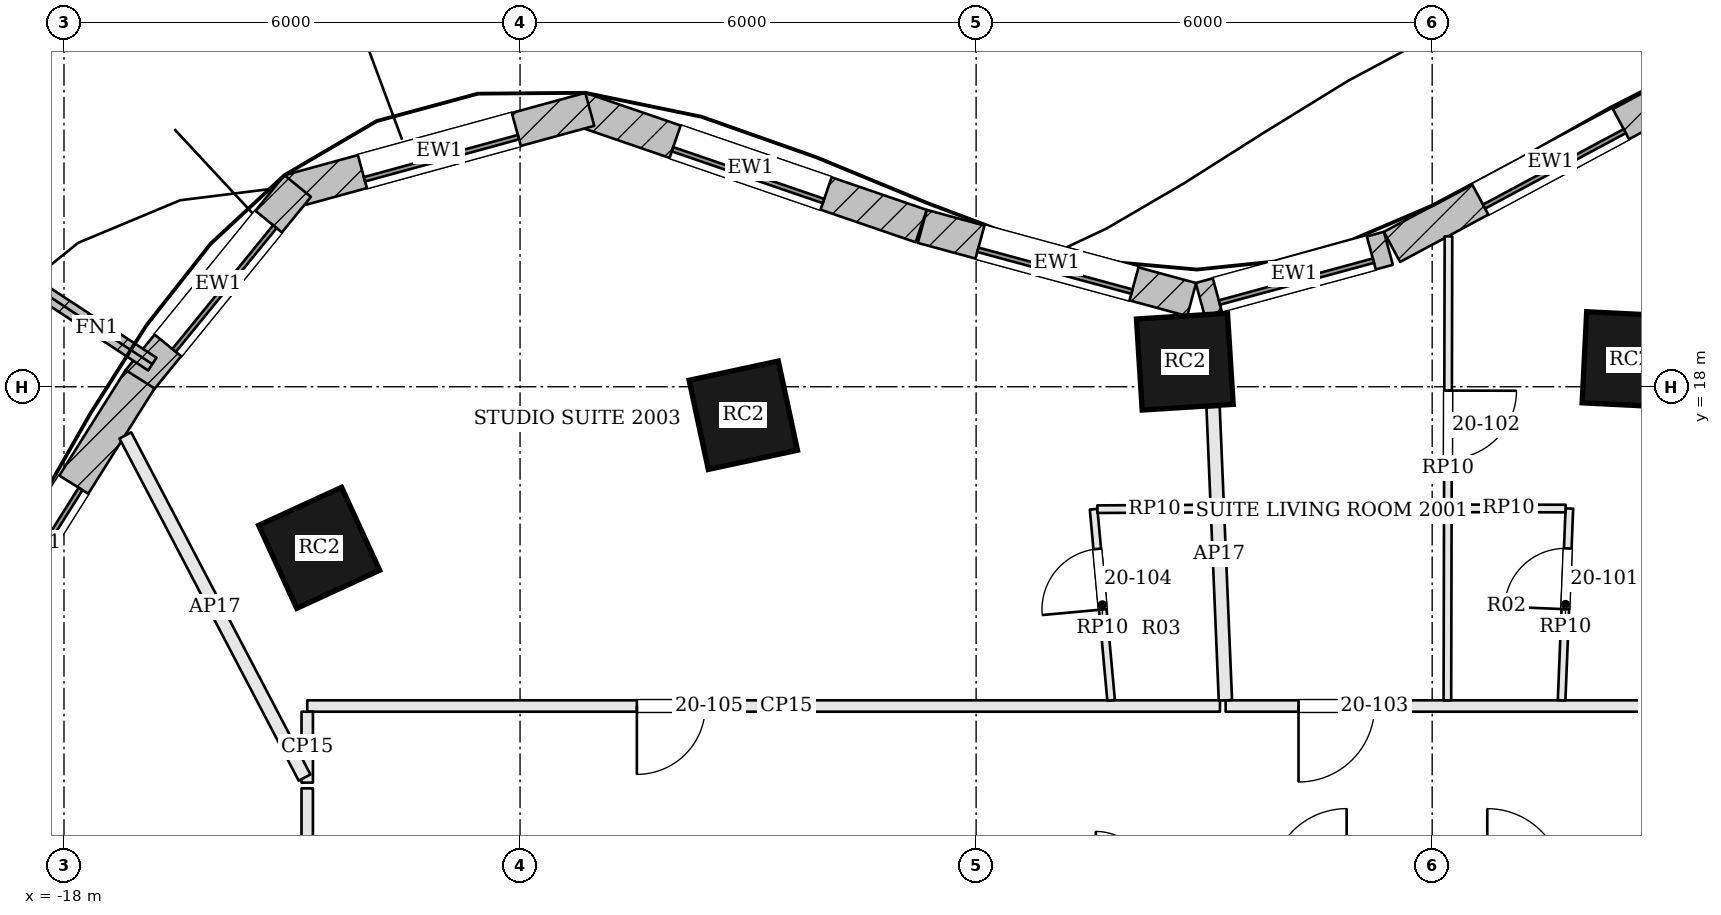
"""IFC4 building model, lengths in metres.
Left out: names, types, materials, properties, quantities, classifications, styles, units other than length and angle.
Written with IfcOpenShell. Run it as: python <this file> out.ifc"""

import sys

from ifc_helpers import new_model, si_unit, direction, frame, frame_2d, origin, origin_2d, place, context, subcontext, project, spatial, rectangle, extrude, element, fill, save


model = new_model("IFC4")
c1 = context("Model", 3, precision=1e-05, world=origin(), true_north=direction((0.0, 1.0)))
c2 = subcontext(c1, "Body", "Model", "MODEL_VIEW")
j1 = project(units=[si_unit("LENGTHUNIT", "METRE"), si_unit("PLANEANGLEUNIT", "RADIAN")], contexts=[c1])
p1 = place(None, origin())
s1 = spatial("IfcSite", under=j1, at=p1, CompositionType="ELEMENT")
p2 = place(p1, origin())
s2 = spatial("IfcBuilding", under=s1, at=p2, CompositionType="ELEMENT")
p3 = place(p2, frame((0.0, 0.0, 88.8)))
s3 = spatial("IfcBuildingStorey", under=s2, at=p3, CompositionType="ELEMENT", Elevation=88.8)
for number, where, z_axis, x_axis in (
    (1, (2.602, 18.358, 0.0), (0.0, 0.0, 1.0), (-0.999, 0.05, 0.0)),
    (2, (-3.254, 18.33, 0.0), (0.0, 0.0, 1.0), (-0.998, -0.063, 0.0)),
    (3, (-9.063, 17.625, 0.0), (0.0, 0.0, 1.0), (-0.978, -0.21, 0.0)),
    (4, (-14.643, 15.881, 0.0), (0.0, 0.0, 1.0), (-0.909, -0.417, 0.0)),
):
    element("IfcColumn", number, at=place(p3, frame(where, z_axis=z_axis, x_axis=x_axis)), inside=s3, PredefinedType="COLUMN", context=c2, shape_type="SweptSolid", body=[
        extrude(rectangle(XDim=1.2, YDim=1.2, at=origin_2d()), origin(), (0.0, 0.0, 1.0), 3.6),
    ])
p4 = place(p3, frame((3.646, 22.079, 0.0), z_axis=(0.0, 0.0, 1.0), x_axis=(-0.881279133897, -0.472596115259, 0.0)))
e5 = element("IfcWall", 5, at=p4, inside=s3, PredefinedType="SOLIDWALL", context=c2, shape_type="SweptSolid", body=[
    extrude(rectangle(XDim=4.737, YDim=0.45, at=frame_2d((2.368, 0.0))), origin(), (0.0, 0.0, 1.0), 3.4),
])
p5 = place(p4, frame((1.318, 0.0, 0.9)))
e6 = element("IfcOpeningElement", 6, at=p5, cuts=e5, PredefinedType="OPENING", context=c2, shape_type="SweptSolid", body=[
    extrude(rectangle(XDim=2.1, YDim=2.0, at=frame_2d((1.05, 1.0))), frame((0.0, 0.235, 0.0), z_axis=(0.0, -1.0, 0.0), x_axis=(1.0, 0.0, 0.0)), (0.0, 0.0, 1.0), 0.47),
])
p6 = place(p3, frame((-0.576, 19.821, 0.0), z_axis=(0.0, 0.0, 1.0), x_axis=(-0.965009398019, -0.262215296532, 0.0)))
e7 = element("IfcWall", 7, at=p6, inside=s3, PredefinedType="SOLIDWALL", context=c2, shape_type="SweptSolid", body=[
    extrude(rectangle(XDim=2.565, YDim=0.45, at=frame_2d((1.283, 0.0))), origin(), (0.0, 0.0, 1.0), 3.4),
])
p7 = place(p6, frame((0.233, 0.0, 0.9)))
e8 = element("IfcOpeningElement", 8, at=p7, cuts=e7, PredefinedType="OPENING", context=c2, shape_type="SweptSolid", body=[
    extrude(rectangle(XDim=2.1, YDim=2.0, at=frame_2d((1.05, 1.0))), frame((0.0, 0.235, 0.0), z_axis=(0.0, -1.0, 0.0), x_axis=(1.0, 0.0, 0.0)), (0.0, 0.0, 1.0), 0.47),
])
p8 = place(p3, frame((-3.164, 19.147, 0.0), z_axis=(0.0, 0.0, 1.0), x_axis=(-0.965039479998, 0.262104563191, 0.0)))
e9 = element("IfcWall", 9, at=p8, inside=s3, PredefinedType="SOLIDWALL", context=c2, shape_type="SweptSolid", body=[
    extrude(rectangle(XDim=3.672, YDim=0.45, at=frame_2d((1.836, 0.0))), origin(), (0.0, 0.0, 1.0), 3.4),
])
p9 = place(p8, frame((0.786, 0.0, 0.9)))
e10 = element("IfcOpeningElement", 10, at=p9, cuts=e9, PredefinedType="OPENING", context=c2, shape_type="SweptSolid", body=[
    extrude(rectangle(XDim=2.1, YDim=2.0, at=frame_2d((1.05, 1.0))), frame((0.0, 0.235, 0.0), z_axis=(0.0, -1.0, 0.0), x_axis=(1.0, 0.0, 0.0)), (0.0, 0.0, 1.0), 0.47),
])
p10 = place(p3, frame((-6.723, 20.114, 0.0), z_axis=(0.0, 0.0, 1.0), x_axis=(-0.945947299026, 0.324320377815, 0.0)))
e11 = element("IfcWall", 11, at=p10, inside=s3, PredefinedType="SOLIDWALL", context=c2, shape_type="SweptSolid", body=[
    extrude(rectangle(XDim=4.745, YDim=0.45, at=frame_2d((2.372, 0.0))), origin(), (0.0, 0.0, 1.0), 3.4),
])
p11 = place(p10, frame((1.322, 0.0, 0.9)))
e12 = element("IfcOpeningElement", 12, at=p11, cuts=e11, PredefinedType="OPENING", context=c2, shape_type="SweptSolid", body=[
    extrude(rectangle(XDim=2.1, YDim=2.0, at=frame_2d((1.05, 1.0))), frame((0.0, 0.235, 0.0), z_axis=(0.0, -1.0, 0.0), x_axis=(1.0, 0.0, 0.0)), (0.0, 0.0, 1.0), 0.47),
])
p12 = place(p3, frame((-11.083, 21.65, 0.0), z_axis=(0.0, 0.0, 1.0), x_axis=(-0.964483204983, -0.264144179011, 0.0)))
e13 = element("IfcWall", 13, at=p12, inside=s3, PredefinedType="SOLIDWALL", context=c2, shape_type="SweptSolid", body=[
    extrude(rectangle(XDim=4.104, YDim=0.45, at=frame_2d((2.052, 0.0))), origin(), (0.0, 0.0, 1.0), 3.4),
])
p13 = place(p12, frame((1.002, 0.0, 0.9)))
e14 = element("IfcOpeningElement", 14, at=p13, cuts=e13, PredefinedType="OPENING", context=c2, shape_type="SweptSolid", body=[
    extrude(rectangle(XDim=2.1, YDim=2.0, at=frame_2d((1.05, 1.0))), frame((0.0, 0.235, 0.0), z_axis=(0.0, -1.0, 0.0), x_axis=(1.0, 0.0, 0.0)), (0.0, 0.0, 1.0), 0.47),
])
p14 = place(p3, frame((-14.926, 20.641, 0.0), z_axis=(0.0, 0.0, 1.0), x_axis=(-0.631548074669, -0.775336720001, 0.0)))
e15 = element("IfcWall", 15, at=p14, inside=s3, PredefinedType="SOLIDWALL", context=c2, shape_type="SweptSolid", body=[
    extrude(rectangle(XDim=3.308, YDim=0.45, at=frame_2d((1.654, 0.0))), origin(), (0.0, 0.0, 1.0), 3.4),
])
p15 = place(p14, frame((0.604, 0.0, 0.9)))
e16 = element("IfcOpeningElement", 16, at=p15, cuts=e15, PredefinedType="OPENING", context=c2, shape_type="SweptSolid", body=[
    extrude(rectangle(XDim=2.1, YDim=2.0, at=frame_2d((1.05, 1.0))), frame((0.0, 0.235, 0.0), z_axis=(0.0, -1.0, 0.0), x_axis=(1.0, 0.0, 0.0)), (0.0, 0.0, 1.0), 0.47),
])
p16 = place(p3, frame((-16.998, 18.099, 0.0), z_axis=(0.0, 0.0, 1.0), x_axis=(-0.532745661304, -0.846275404559, 0.0)))
e17 = element("IfcWall", 17, at=p16, inside=s3, PredefinedType="SOLIDWALL", context=c2, shape_type="SweptSolid", body=[
    extrude(rectangle(XDim=5.076, YDim=0.45, at=frame_2d((2.538, 0.0))), origin(), (0.0, 0.0, 1.0), 3.4),
])
p17 = place(p16, frame((1.638, 0.0, 0.9)))
e18 = element("IfcOpeningElement", 18, at=p17, cuts=e17, PredefinedType="OPENING", context=c2, shape_type="SweptSolid", body=[
    extrude(rectangle(XDim=1.8, YDim=2.0, at=frame_2d((0.9, 1.0))), frame((0.0, 0.235, 0.0), z_axis=(0.0, -1.0, 0.0), x_axis=(1.0, 0.0, 0.0)), (0.0, 0.0, 1.0), 0.47),
])
p18 = place(p3, frame((-16.838, 18.298, 0.0), z_axis=(0.0, 0.0, 1.0), x_axis=(-0.835871900419, 0.548924554097, 0.0)))
e19 = element("IfcWall", 19, at=p18, inside=s3, PredefinedType="SOLIDWALL", context=c2, shape_type="SweptSolid", body=[
    extrude(rectangle(XDim=1.75, YDim=0.2, at=frame_2d((0.875, 0.0))), origin(), (0.0, 0.0, 1.0), 3.4),
])
p19 = place(p3, frame((8.911, 13.8, 0.0), z_axis=(0.0, 0.0, 1.0), x_axis=(-1.0, 0.0, 0.0)))
e20 = element("IfcWall", 20, at=p19, inside=s3, PredefinedType="PARTITIONING", context=c2, shape_type="SweptSolid", body=[
    extrude(rectangle(XDim=11.628, YDim=0.15, at=frame_2d((5.814, 0.0))), origin(), (0.0, 0.0, 1.0), 2.784),
])
p20 = place(p19, frame((9.669, 0.0, 0.0)))
e21 = element("IfcOpeningElement", 21, at=p20, cuts=e20, PredefinedType="OPENING", context=c2, shape_type="SweptSolid", body=[
    extrude(rectangle(XDim=1.0, YDim=2.1, at=frame_2d((0.5, 1.05))), frame((0.0, 0.085, 0.0), z_axis=(0.0, -1.0, 0.0), x_axis=(1.0, 0.0, 0.0)), (0.0, 0.0, 1.0), 0.17),
])
p21 = place(p3, frame((-2.882, 17.732, 0.0), z_axis=(0.0, 0.0, 1.0), x_axis=(0.04199090748, -0.999117992876, 0.0)))
e22 = element("IfcWall", 22, at=p21, inside=s3, PredefinedType="PARTITIONING", context=c2, shape_type="SweptSolid", body=[
    extrude(rectangle(XDim=3.861, YDim=0.175, at=frame_2d((1.93, 0.0))), origin(), (0.0, 0.0, 1.0), 2.784),
])
p22 = place(p3, frame((-2.792, 13.8, 0.0), z_axis=(0.0, 0.0, 1.0), x_axis=(-1.0, 0.0, 0.0)))
e23 = element("IfcWall", 23, at=p22, inside=s3, PredefinedType="PARTITIONING", context=c2, shape_type="SweptSolid", body=[
    extrude(rectangle(XDim=12.008, YDim=0.15, at=frame_2d((6.004, 0.0))), origin(), (0.0, 0.0, 1.0), 2.784),
])
p23 = place(p22, frame((6.771, 0.0, 0.0)))
e24 = element("IfcOpeningElement", 24, at=p23, cuts=e23, PredefinedType="OPENING", context=c2, shape_type="SweptSolid", body=[
    extrude(rectangle(XDim=0.9, YDim=2.4, at=frame_2d((0.45, 1.2))), frame((0.0, 0.085, 0.0), z_axis=(0.0, -1.0, 0.0), x_axis=(1.0, 0.0, 0.0)), (0.0, 0.0, 1.0), 0.17),
])
p24 = place(p3, frame((-14.8, 13.725, 0.0), z_axis=(0.0, 0.0, 1.0), x_axis=(0.0, -1.0, 0.0)))
e25 = element("IfcWall", 25, at=p24, inside=s3, PredefinedType="PARTITIONING", context=c2, shape_type="SweptSolid", body=[
    extrude(rectangle(XDim=0.933, YDim=0.15, at=frame_2d((0.467, 0.0))), origin(), (0.0, 0.0, 1.0), 2.784),
])
p25 = place(p3, frame((-17.193, 17.36, 0.0), z_axis=(0.0, 0.0, 1.0), x_axis=(0.46402494572, -0.885822132118, 0.0)))
e26 = element("IfcWall", 26, at=p25, inside=s3, PredefinedType="PARTITIONING", context=c2, shape_type="SweptSolid", body=[
    extrude(rectangle(XDim=5.082, YDim=0.175, at=frame_2d((2.541, 0.0))), origin(), (0.0, 0.0, 1.0), 2.784),
])
p26 = place(p3, frame((-14.8, 12.717, 0.0), z_axis=(0.0, 0.0, 1.0), x_axis=(0.0, -1.0, 0.0)))
e27 = element("IfcWall", 27, at=p26, inside=s3, PredefinedType="PARTITIONING", context=c2, shape_type="SweptSolid", body=[
    extrude(rectangle(XDim=2.22, YDim=0.15, at=frame_2d((1.11, 0.0))), origin(), (0.0, 0.0, 1.0), 2.784),
])
p27 = place(p3, frame((0.214, 19.979, 0.0), z_axis=(0.0, 0.0, 1.0), x_axis=(-0.002359899032, -0.999997215434, 0.0)))
e28 = element("IfcWall", 28, at=p27, inside=s3, PredefinedType="PARTITIONING", context=c2, shape_type="SweptSolid", body=[
    extrude(rectangle(XDim=6.104, YDim=0.1, at=frame_2d((3.052, 0.0))), origin(), (0.0, 0.0, 1.0), 2.884),
])
p28 = place(p27, frame((2.029, 0.0, 0.0)))
e29 = element("IfcOpeningElement", 29, at=p28, cuts=e28, PredefinedType="OPENING", context=c2, shape_type="SweptSolid", body=[
    extrude(rectangle(XDim=0.9, YDim=2.4, at=frame_2d((0.45, 1.2))), frame((0.0, 0.06, 0.0), z_axis=(0.0, -1.0, 0.0), x_axis=(1.0, 0.0, 0.0)), (0.0, 0.0, 1.0), 0.12),
])
p29 = place(p3, frame((1.703, 13.875, 0.0), z_axis=(0.0, 0.0, 1.0), x_axis=(0.040512484472, 0.999179032307, 0.0)))
e30 = element("IfcWall", 30, at=p29, inside=s3, PredefinedType="PARTITIONING", context=c2, shape_type="SweptSolid", body=[
    extrude(rectangle(XDim=2.525, YDim=0.1, at=frame_2d((1.262, 0.0))), origin(), (0.0, 0.0, 1.0), 2.884),
])
p30 = place(p29, frame((1.2, 0.0, 0.0)))
e31 = element("IfcOpeningElement", 31, at=p30, cuts=e30, PredefinedType="OPENING", context=c2, shape_type="SweptSolid", body=[
    extrude(rectangle(XDim=0.8, YDim=2.1, at=frame_2d((0.4, 1.05))), frame((0.0, 0.06, 0.0), z_axis=(0.0, -1.0, 0.0), x_axis=(1.0, 0.0, 0.0)), (0.0, 0.0, 1.0), 0.12),
])
p31 = place(p3, frame((1.755, 16.398, 0.0), z_axis=(0.0, 0.0, 1.0), x_axis=(-0.999999151462, 0.001302718321, 0.0)))
e32 = element("IfcWall", 32, at=p31, inside=s3, PredefinedType="PARTITIONING", context=c2, shape_type="SweptSolid", body=[
    extrude(rectangle(XDim=1.499, YDim=0.1, at=frame_2d((0.75, 0.0))), origin(), (0.0, 0.0, 1.0), 2.884),
])
p32 = place(p3, frame((-4.224, 13.875, 0.0), z_axis=(0.0, 0.0, 1.0), x_axis=(-0.09127675815, 0.995825563752, 0.0)))
e33 = element("IfcWall", 33, at=p32, inside=s3, PredefinedType="PARTITIONING", context=c2, shape_type="SweptSolid", body=[
    extrude(rectangle(XDim=2.525, YDim=0.1, at=frame_2d((1.262, 0.0))), origin(), (0.0, 0.0, 1.0), 2.884),
])
p33 = place(p32, frame((1.2, 0.0, 0.0)))
e34 = element("IfcOpeningElement", 34, at=p33, cuts=e33, PredefinedType="OPENING", context=c2, shape_type="SweptSolid", body=[
    extrude(rectangle(XDim=0.8, YDim=2.1, at=frame_2d((0.4, 1.05))), frame((0.0, 0.06, 0.0), z_axis=(0.0, -1.0, 0.0), x_axis=(1.0, 0.0, 0.0)), (0.0, 0.0, 1.0), 0.12),
])
p34 = place(p3, frame((-4.404, 16.389, 0.0), z_axis=(0.0, 0.0, 1.0), x_axis=(0.999986489733, 0.005198110408, 0.0)))
e35 = element("IfcWall", 35, at=p34, inside=s3, PredefinedType="PARTITIONING", context=c2, shape_type="SweptSolid", body=[
    extrude(rectangle(XDim=1.503, YDim=0.1, at=frame_2d((0.751, 0.0))), origin(), (0.0, 0.0, 1.0), 2.884),
])
p35 = place(p5, origin())
e36 = element("IfcWindow", 36, at=p35, inside=s3, PartitioningType="SINGLE_PANEL", PredefinedType="WINDOW", context=c2, shape_type="SweptSolid", body=[
    extrude(rectangle(XDim=2.1, YDim=2.0, at=frame_2d((1.05, 1.0))), frame((0.0, 0.135, 0.0), z_axis=(0.0, -1.0, 0.0), x_axis=(1.0, 0.0, 0.0)), (0.0, 0.0, 1.0), 0.06),
])
fill(e6, e36)
p36 = place(p7, origin())
e37 = element("IfcWindow", 37, at=p36, inside=s3, PartitioningType="SINGLE_PANEL", PredefinedType="WINDOW", context=c2, shape_type="SweptSolid", body=[
    extrude(rectangle(XDim=2.1, YDim=2.0, at=frame_2d((1.05, 1.0))), frame((0.0, 0.135, 0.0), z_axis=(0.0, -1.0, 0.0), x_axis=(1.0, 0.0, 0.0)), (0.0, 0.0, 1.0), 0.06),
])
fill(e8, e37)
p37 = place(p9, origin())
e38 = element("IfcWindow", 38, at=p37, inside=s3, PartitioningType="SINGLE_PANEL", PredefinedType="WINDOW", context=c2, shape_type="SweptSolid", body=[
    extrude(rectangle(XDim=2.1, YDim=2.0, at=frame_2d((1.05, 1.0))), frame((0.0, 0.135, 0.0), z_axis=(0.0, -1.0, 0.0), x_axis=(1.0, 0.0, 0.0)), (0.0, 0.0, 1.0), 0.06),
])
fill(e10, e38)
p38 = place(p11, origin())
e39 = element("IfcWindow", 39, at=p38, inside=s3, PartitioningType="SINGLE_PANEL", PredefinedType="WINDOW", context=c2, shape_type="SweptSolid", body=[
    extrude(rectangle(XDim=2.1, YDim=2.0, at=frame_2d((1.05, 1.0))), frame((0.0, 0.135, 0.0), z_axis=(0.0, -1.0, 0.0), x_axis=(1.0, 0.0, 0.0)), (0.0, 0.0, 1.0), 0.06),
])
fill(e12, e39)
p39 = place(p13, origin())
e40 = element("IfcWindow", 40, at=p39, inside=s3, PartitioningType="SINGLE_PANEL", PredefinedType="WINDOW", context=c2, shape_type="SweptSolid", body=[
    extrude(rectangle(XDim=2.1, YDim=2.0, at=frame_2d((1.05, 1.0))), frame((0.0, 0.135, 0.0), z_axis=(0.0, -1.0, 0.0), x_axis=(1.0, 0.0, 0.0)), (0.0, 0.0, 1.0), 0.06),
])
fill(e14, e40)
p40 = place(p15, origin())
e41 = element("IfcWindow", 41, at=p40, inside=s3, PartitioningType="SINGLE_PANEL", PredefinedType="WINDOW", context=c2, shape_type="SweptSolid", body=[
    extrude(rectangle(XDim=2.1, YDim=2.0, at=frame_2d((1.05, 1.0))), frame((0.0, 0.135, 0.0), z_axis=(0.0, -1.0, 0.0), x_axis=(1.0, 0.0, 0.0)), (0.0, 0.0, 1.0), 0.06),
])
fill(e16, e41)
p41 = place(p17, origin())
e42 = element("IfcWindow", 42, at=p41, inside=s3, PartitioningType="SINGLE_PANEL", PredefinedType="WINDOW", context=c2, shape_type="SweptSolid", body=[
    extrude(rectangle(XDim=1.8, YDim=2.0, at=frame_2d((0.9, 1.0))), frame((0.0, 0.135, 0.0), z_axis=(0.0, -1.0, 0.0), x_axis=(1.0, 0.0, 0.0)), (0.0, 0.0, 1.0), 0.06),
])
fill(e18, e42)
p42 = place(p30, origin())
e43 = element("IfcDoor", 43, at=p42, inside=s3, OperationType="SINGLE_SWING_LEFT", PredefinedType="DOOR", context=c2, shape_type="SweptSolid", body=[
    extrude(rectangle(XDim=0.8, YDim=2.1, at=frame_2d((0.4, 1.05))), frame((0.0, 0.025, 0.0), z_axis=(0.0, -1.0, 0.0), x_axis=(1.0, 0.0, 0.0)), (0.0, 0.0, 1.0), 0.05),
])
fill(e31, e43)
p43 = place(p28, origin())
e44 = element("IfcDoor", 44, at=p43, inside=s3, OperationType="SINGLE_SWING_LEFT", PredefinedType="DOOR", context=c2, shape_type="SweptSolid", body=[
    extrude(rectangle(XDim=0.9, YDim=2.4, at=frame_2d((0.45, 1.2))), frame((0.0, 0.025, 0.0), z_axis=(0.0, -1.0, 0.0), x_axis=(1.0, 0.0, 0.0)), (0.0, 0.0, 1.0), 0.05),
])
fill(e29, e44)
p44 = place(p20, origin())
e45 = element("IfcDoor", 45, at=p44, inside=s3, OperationType="SINGLE_SWING_RIGHT", PredefinedType="DOOR", context=c2, shape_type="SweptSolid", body=[
    extrude(rectangle(XDim=1.0, YDim=2.1, at=frame_2d((0.5, 1.05))), frame((0.0, 0.025, 0.0), z_axis=(0.0, -1.0, 0.0), x_axis=(1.0, 0.0, 0.0)), (0.0, 0.0, 1.0), 0.05),
])
fill(e21, e45)
p45 = place(p33, origin())
e46 = element("IfcDoor", 46, at=p45, inside=s3, OperationType="SINGLE_SWING_LEFT", PredefinedType="DOOR", context=c2, shape_type="SweptSolid", body=[
    extrude(rectangle(XDim=0.8, YDim=2.1, at=frame_2d((0.4, 1.05))), frame((0.0, 0.025, 0.0), z_axis=(0.0, -1.0, 0.0), x_axis=(1.0, 0.0, 0.0)), (0.0, 0.0, 1.0), 0.05),
])
fill(e34, e46)
p46 = place(p23, origin())
e47 = element("IfcDoor", 47, at=p46, inside=s3, OperationType="SINGLE_SWING_RIGHT", PredefinedType="DOOR", context=c2, shape_type="SweptSolid", body=[
    extrude(rectangle(XDim=0.9, YDim=2.4, at=frame_2d((0.45, 1.2))), frame((0.0, 0.025, 0.0), z_axis=(0.0, -1.0, 0.0), x_axis=(1.0, 0.0, 0.0)), (0.0, 0.0, 1.0), 0.05),
])
fill(e24, e47)
save(model, sys.argv[1])
